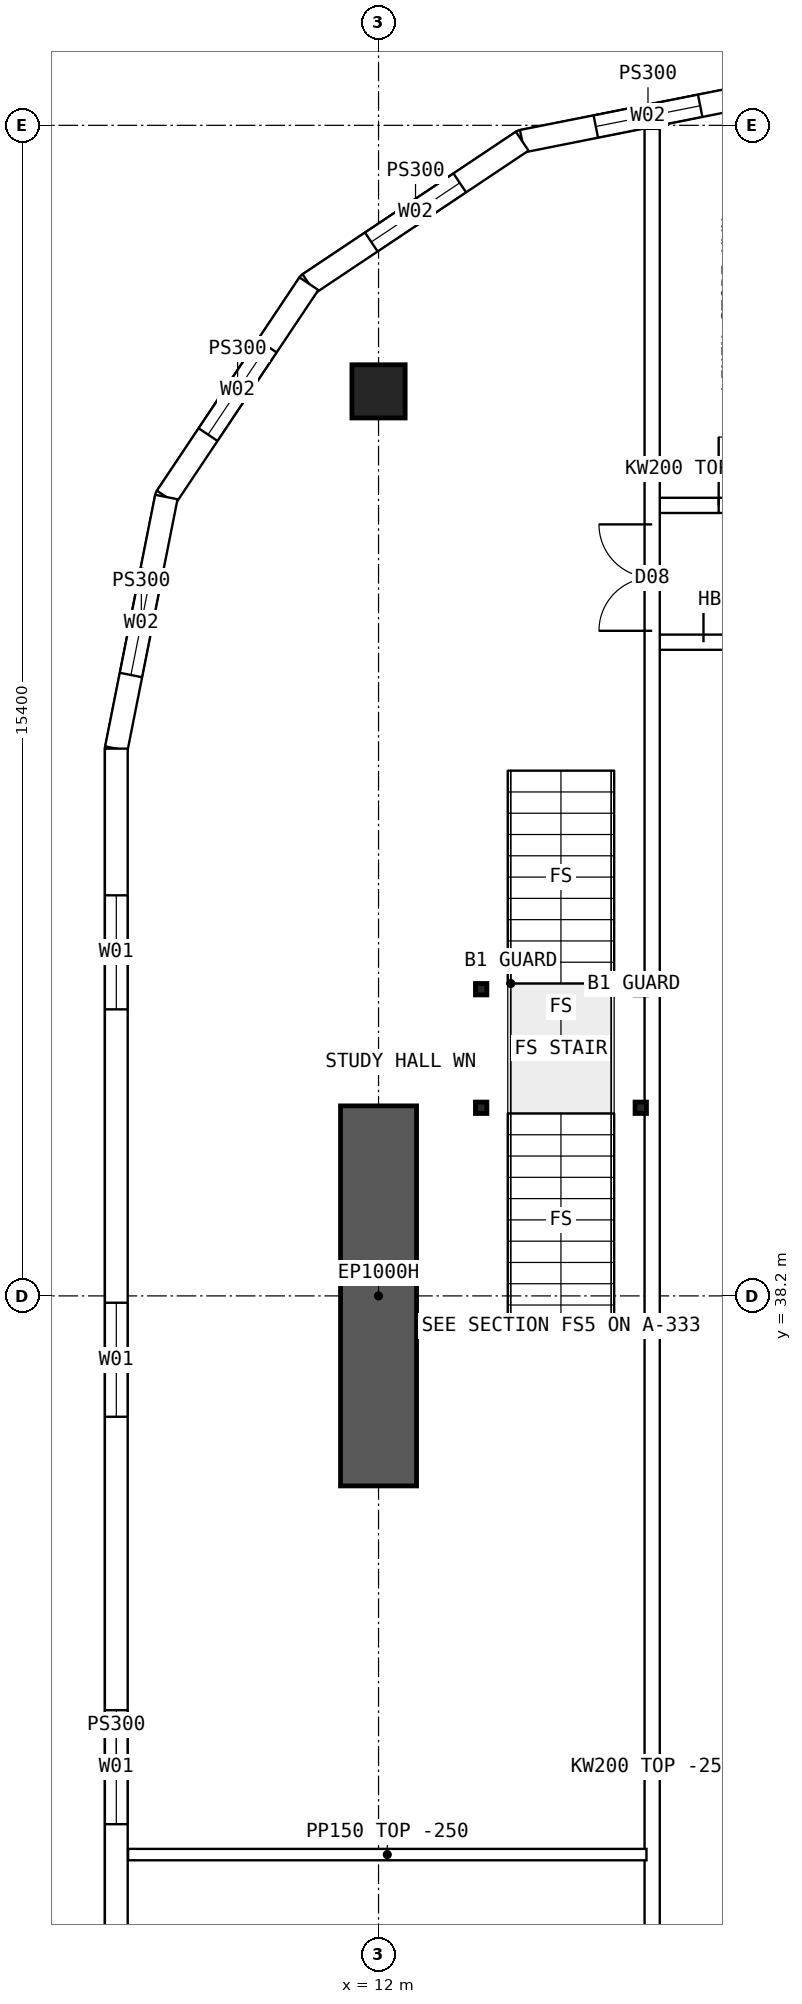
"""IFC4 building model, lengths in metres.
Left out: names, types, materials, properties, quantities, classifications, styles, units other than length and angle.
Written with IfcOpenShell. Run it as: python <this file> out.ifc"""

import sys

from ifc_helpers import new_model, si_unit, direction, frame, frame_2d, origin, origin_2d, place, context, subcontext, project, spatial, polyline, rectangle, hollow_rectangle, outline, extrude, element, fill, save


model = new_model("IFC4")
c1 = context("Model", 3, precision=1e-05, world=origin(), true_north=direction((0.0, 1.0)))
c2 = subcontext(c1, "Body", "Model", "MODEL_VIEW")
j1 = project(units=[si_unit("LENGTHUNIT", "METRE"), si_unit("PLANEANGLEUNIT", "RADIAN")], contexts=[c1])
p1 = place(None, origin())
s1 = spatial("IfcSite", under=j1, at=p1, CompositionType="ELEMENT")
p2 = place(p1, origin())
s2 = spatial("IfcBuilding", under=s1, at=p2, CompositionType="ELEMENT")
p3 = place(p2, frame((0.0, 0.0, 148.6)))
s3 = spatial("IfcBuildingStorey", under=s2, at=p3, CompositionType="ELEMENT", Elevation=148.6)
p4 = place(p3, frame((12.0, 50.1, 0.0), z_axis=(0.0, 0.0, 1.0), x_axis=(1.0, 0.0, 0.0)))
e1 = element("IfcColumn", 1, at=p4, inside=s3, PredefinedType="COLUMN", context=c2, shape_type="SweptSolid", body=[
    extrude(hollow_rectangle(XDim=0.7, YDim=0.7, WallThickness=0.07, at=origin_2d()), origin(), (0.0, 0.0, 1.0), 3.75),
])
p5 = place(p3, frame((12.0, 35.7, 0.0), z_axis=(0.0, 0.0, 1.0), x_axis=(0.0, 1.0, 0.0)))
e2 = element("IfcWall", 2, at=p5, inside=s3, PredefinedType="SHEAR", context=c2, shape_type="SweptSolid", body=[
    extrude(rectangle(XDim=5.0, YDim=1.0, at=frame_2d((2.5, 0.0))), origin(), (0.0, 0.0, 1.0), 3.75),
])
p6 = place(p3, frame((8.55, 45.4, 0.0), z_axis=(0.0, 0.0, 1.0), x_axis=(0.0, -1.0, 0.0)))
e3 = element("IfcWall", 3, at=p6, inside=s3, PredefinedType="SOLIDWALL", context=c2, shape_type="SweptSolid", body=[
    extrude(outline(polyline([(-0.015, -0.15), (26.815, -0.15), (26.785, 0.15), (0.015, 0.15), (-0.015, -0.15)])), origin(), (0.0, 0.0, 1.0), 3.5),
])
p7 = place(p6, frame((1.93, 0.0, 0.9)))
e4 = element("IfcOpeningElement", 4, at=p7, cuts=e3, PredefinedType="OPENING", context=c2, shape_type="SweptSolid", body=[
    extrude(rectangle(XDim=1.5, YDim=2.0, at=frame_2d((0.75, 1.0))), frame((0.0, 0.16, 0.0), z_axis=(0.0, -1.0, 0.0), x_axis=(1.0, 0.0, 0.0)), (0.0, 0.0, 1.0), 0.32),
])
p8 = place(p6, frame((7.29, 0.0, 0.9)))
e5 = element("IfcOpeningElement", 5, at=p8, cuts=e3, PredefinedType="OPENING", context=c2, shape_type="SweptSolid", body=[
    extrude(rectangle(XDim=1.5, YDim=2.0, at=frame_2d((0.75, 1.0))), frame((0.0, 0.16, 0.0), z_axis=(0.0, -1.0, 0.0), x_axis=(1.0, 0.0, 0.0)), (0.0, 0.0, 1.0), 0.32),
])
p9 = place(p6, frame((12.65, 0.0, 0.9)))
e6 = element("IfcOpeningElement", 6, at=p9, cuts=e3, PredefinedType="OPENING", context=c2, shape_type="SweptSolid", body=[
    extrude(rectangle(XDim=1.5, YDim=2.0, at=frame_2d((0.75, 1.0))), frame((0.0, 0.16, 0.0), z_axis=(0.0, -1.0, 0.0), x_axis=(1.0, 0.0, 0.0)), (0.0, 0.0, 1.0), 0.32),
])
p10 = place(p6, frame((18.01, 0.0, 0.9)))
e7 = element("IfcOpeningElement", 7, at=p10, cuts=e3, PredefinedType="OPENING", context=c2, shape_type="SweptSolid", body=[
    extrude(rectangle(XDim=1.5, YDim=2.0, at=frame_2d((0.75, 1.0))), frame((0.0, 0.16, 0.0), z_axis=(0.0, -1.0, 0.0), x_axis=(1.0, 0.0, 0.0)), (0.0, 0.0, 1.0), 0.32),
])
p11 = place(p6, frame((23.37, 0.0, 0.9)))
e8 = element("IfcOpeningElement", 8, at=p11, cuts=e3, PredefinedType="OPENING", context=c2, shape_type="SweptSolid", body=[
    extrude(rectangle(XDim=1.5, YDim=2.0, at=frame_2d((0.75, 1.0))), frame((0.0, 0.16, 0.0), z_axis=(0.0, -1.0, 0.0), x_axis=(1.0, 0.0, 0.0)), (0.0, 0.0, 1.0), 0.32),
])
p12 = place(p3, frame((17.2, 54.05, 0.0), z_axis=(0.0, 0.0, 1.0), x_axis=(-0.98078325777, -0.195100490205, 0.0)))
e9 = element("IfcWall", 9, at=p12, inside=s3, PredefinedType="SOLIDWALL", context=c2, shape_type="SweptSolid", body=[
    extrude(outline(polyline([(-0.03, -0.15), (3.405, -0.15), (3.345, 0.15), (0.03, 0.15), (-0.03, -0.15)])), origin(), (0.0, 0.0, 1.0), 3.5),
])
p13 = place(p12, frame((0.988, 0.0, 0.9)))
e10 = element("IfcOpeningElement", 10, at=p13, cuts=e9, PredefinedType="OPENING", context=c2, shape_type="SweptSolid", body=[
    extrude(rectangle(XDim=1.4, YDim=1.8, at=frame_2d((0.7, 0.9))), frame((0.0, 0.16, 0.0), z_axis=(0.0, -1.0, 0.0), x_axis=(1.0, 0.0, 0.0)), (0.0, 0.0, 1.0), 0.32),
])
p14 = place(p3, frame((13.89, 53.392, 0.0), z_axis=(0.0, 0.0, 1.0), x_axis=(-0.831493450887, -0.555534554399, 0.0)))
e11 = element("IfcWall", 11, at=p14, inside=s3, PredefinedType="SOLIDWALL", context=c2, shape_type="SweptSolid", body=[
    extrude(outline(polyline([(-0.03, -0.15), (3.405, -0.15), (3.345, 0.15), (0.03, 0.15), (-0.03, -0.15)])), origin(), (0.0, 0.0, 1.0), 3.5),
])
p15 = place(p14, frame((0.988, 0.0, 0.9)))
e12 = element("IfcOpeningElement", 12, at=p15, cuts=e11, PredefinedType="OPENING", context=c2, shape_type="SweptSolid", body=[
    extrude(rectangle(XDim=1.4, YDim=1.8, at=frame_2d((0.7, 0.9))), frame((0.0, 0.16, 0.0), z_axis=(0.0, -1.0, 0.0), x_axis=(1.0, 0.0, 0.0)), (0.0, 0.0, 1.0), 0.32),
])
p16 = place(p3, frame((11.083, 51.517, 0.0), z_axis=(0.0, 0.0, 1.0), x_axis=(-0.555534554399, -0.831493450887, 0.0)))
e13 = element("IfcWall", 13, at=p16, inside=s3, PredefinedType="SOLIDWALL", context=c2, shape_type="SweptSolid", body=[
    extrude(outline(polyline([(-0.03, -0.15), (3.405, -0.15), (3.345, 0.15), (0.03, 0.15), (-0.03, -0.15)])), origin(), (0.0, 0.0, 1.0), 3.5),
])
p17 = place(p16, frame((0.988, 0.0, 0.9)))
e14 = element("IfcOpeningElement", 14, at=p17, cuts=e13, PredefinedType="OPENING", context=c2, shape_type="SweptSolid", body=[
    extrude(rectangle(XDim=1.4, YDim=1.8, at=frame_2d((0.7, 0.9))), frame((0.0, 0.16, 0.0), z_axis=(0.0, -1.0, 0.0), x_axis=(1.0, 0.0, 0.0)), (0.0, 0.0, 1.0), 0.32),
])
p18 = place(p3, frame((9.208, 48.71, 0.0), z_axis=(0.0, 0.0, 1.0), x_axis=(-0.19508664885, -0.980786011034, 0.0)))
e15 = element("IfcWall", 15, at=p18, inside=s3, PredefinedType="SOLIDWALL", context=c2, shape_type="SweptSolid", body=[
    extrude(outline(polyline([(-0.03, -0.15), (3.39, -0.15), (3.36, 0.15), (0.03, 0.15), (-0.03, -0.15)])), origin(), (0.0, 0.0, 1.0), 3.5),
])
p19 = place(p18, frame((0.988, 0.0, 0.9)))
e16 = element("IfcOpeningElement", 16, at=p19, cuts=e15, PredefinedType="OPENING", context=c2, shape_type="SweptSolid", body=[
    extrude(rectangle(XDim=1.4, YDim=1.8, at=frame_2d((0.7, 0.9))), frame((0.0, 0.16, 0.0), z_axis=(0.0, -1.0, 0.0), x_axis=(1.0, 0.0, 0.0)), (0.0, 0.0, 1.0), 0.32),
])
p20 = place(p3, frame((15.6, 48.6, 0.0), z_axis=(0.0, 0.0, 1.0), x_axis=(1.0, 0.0, 0.0)))
e17 = element("IfcWall", 17, at=p20, inside=s3, PredefinedType="SOLIDWALL", context=c2, shape_type="SweptSolid", body=[
    extrude(rectangle(XDim=1.975, YDim=0.2, at=frame_2d((0.987, 0.0))), origin(), (0.0, 0.0, 1.0), 3.5),
])
p21 = place(p20, frame((0.875, 0.0, 0.0)))
e18 = element("IfcOpeningElement", 18, at=p21, cuts=e17, PredefinedType="OPENING", context=c2, shape_type="SweptSolid", body=[
    extrude(rectangle(XDim=0.9, YDim=2.1, at=frame_2d((0.45, 1.05))), frame((0.0, 0.11, 0.0), z_axis=(0.0, -1.0, 0.0), x_axis=(1.0, 0.0, 0.0)), (0.0, 0.0, 1.0), 0.22),
])
p22 = place(p3, frame((15.6, 46.8, 0.0), z_axis=(0.0, 0.0, 1.0), x_axis=(1.0, 0.0, 0.0)))
e19 = element("IfcWall", 19, at=p22, inside=s3, PredefinedType="SOLIDWALL", context=c2, shape_type="SweptSolid", body=[
    extrude(rectangle(XDim=1.975, YDim=0.2, at=frame_2d((0.987, 0.0))), origin(), (0.0, 0.0, 1.0), 3.5),
])
p23 = place(p22, frame((0.675, 0.0, 0.0)))
e20 = element("IfcOpeningElement", 20, at=p23, cuts=e19, PredefinedType="OPENING", context=c2, shape_type="SweptSolid", body=[
    extrude(rectangle(XDim=1.2, YDim=2.1, at=frame_2d((0.6, 1.05))), frame((0.0, 0.11, 0.0), z_axis=(0.0, -1.0, 0.0), x_axis=(1.0, 0.0, 0.0)), (0.0, 0.0, 1.0), 0.22),
])
p24 = place(p3, frame((8.705, 30.85, 0.0), z_axis=(0.0, 0.0, 1.0), x_axis=(1.0, 0.0, 0.0)))
e21 = element("IfcWall", 21, at=p24, inside=s3, PredefinedType="PARTITIONING", context=c2, shape_type="SweptSolid", body=[
    extrude(outline(polyline([(0.0, 0.0), (6.82, 0.0), (6.82, 3.5), (3.597, 3.5), (3.595, 3.05), (2.997, 3.05), (2.995, 3.5), (0.0, 3.5), (0.0, 0.0)])), frame((0.0, 0.075, 0.0), z_axis=(0.0, -1.0, 0.0), x_axis=(1.0, 0.0, 0.0)), (0.0, 0.0, 1.0), 0.15),
])
p25 = place(p3, frame((15.6, 10.446, 0.0), z_axis=(0.0, 0.0, 1.0), x_axis=(0.0, 1.0, 0.0)))
e22 = element("IfcWall", 22, at=p25, inside=s3, PredefinedType="SOLIDWALL", context=c2, shape_type="SweptSolid", body=[
    extrude(rectangle(XDim=43.107, YDim=0.2, at=frame_2d((21.554, 0.0))), origin(), (0.0, 0.0, 1.0), 3.5),
])
p26 = place(p25, frame((5.104, 0.0, 0.0)))
e23 = element("IfcOpeningElement", 23, at=p26, cuts=e22, PredefinedType="OPENING", context=c2, shape_type="SweptSolid", body=[
    extrude(rectangle(XDim=1.4, YDim=2.1, at=frame_2d((0.7, 1.05))), frame((0.0, 0.11, 0.0), z_axis=(0.0, -1.0, 0.0), x_axis=(1.0, 0.0, 0.0)), (0.0, 0.0, 1.0), 0.22),
])
p27 = place(p25, frame((36.504, 0.0, 0.0)))
e24 = element("IfcOpeningElement", 24, at=p27, cuts=e22, PredefinedType="OPENING", context=c2, shape_type="SweptSolid", body=[
    extrude(rectangle(XDim=1.4, YDim=2.1, at=frame_2d((0.7, 1.05))), frame((0.0, 0.11, 0.0), z_axis=(0.0, -1.0, 0.0), x_axis=(1.0, 0.0, 0.0)), (0.0, 0.0, 1.0), 0.22),
])
for number, where, z_axis, x_axis in (
    (25, (13.35, 40.675, 0.0), (0.0, 0.0, 1.0), (1.0, 0.0, 0.0)),
    (26, (15.45, 40.675, 0.0), (0.0, 0.0, 1.0), (1.0, 0.0, 0.0)),
    (27, (13.35, 42.235, 0.0), (0.0, 0.0, 1.0), (1.0, 0.0, 0.0)),
    (28, (15.45, 42.235, 0.0), (0.0, 0.0, 1.0), (1.0, 0.0, 0.0)),
):
    element("IfcColumn", number, at=place(p3, frame(where, z_axis=z_axis, x_axis=x_axis)), inside=s3, PredefinedType="COLUMN", context=c2, shape_type="SweptSolid", body=[
        extrude(hollow_rectangle(XDim=0.15, YDim=0.15, WallThickness=0.008, at=origin_2d()), origin(), (0.0, 0.0, 1.0), 3.5),
    ])
p28 = place(p7, origin())
e29 = element("IfcWindow", 29, at=p28, inside=s3, PartitioningType="SINGLE_PANEL", PredefinedType="WINDOW", context=c2, shape_type="SweptSolid", body=[
    extrude(rectangle(XDim=1.5, YDim=2.0, at=frame_2d((0.75, 1.0))), frame((0.0, 0.03, 0.0), z_axis=(0.0, -1.0, 0.0), x_axis=(1.0, 0.0, 0.0)), (0.0, 0.0, 1.0), 0.06),
])
fill(e4, e29)
p29 = place(p8, origin())
e30 = element("IfcWindow", 30, at=p29, inside=s3, PartitioningType="SINGLE_PANEL", PredefinedType="WINDOW", context=c2, shape_type="SweptSolid", body=[
    extrude(rectangle(XDim=1.5, YDim=2.0, at=frame_2d((0.75, 1.0))), frame((0.0, 0.03, 0.0), z_axis=(0.0, -1.0, 0.0), x_axis=(1.0, 0.0, 0.0)), (0.0, 0.0, 1.0), 0.06),
])
fill(e5, e30)
p30 = place(p9, origin())
e31 = element("IfcWindow", 31, at=p30, inside=s3, PartitioningType="SINGLE_PANEL", PredefinedType="WINDOW", context=c2, shape_type="SweptSolid", body=[
    extrude(rectangle(XDim=1.5, YDim=2.0, at=frame_2d((0.75, 1.0))), frame((0.0, 0.03, 0.0), z_axis=(0.0, -1.0, 0.0), x_axis=(1.0, 0.0, 0.0)), (0.0, 0.0, 1.0), 0.06),
])
fill(e6, e31)
p31 = place(p13, origin())
e32 = element("IfcWindow", 32, at=p31, inside=s3, PartitioningType="SINGLE_PANEL", PredefinedType="WINDOW", context=c2, shape_type="SweptSolid", body=[
    extrude(rectangle(XDim=1.4, YDim=1.8, at=frame_2d((0.7, 0.9))), frame((0.0, 0.03, 0.0), z_axis=(0.0, -1.0, 0.0), x_axis=(1.0, 0.0, 0.0)), (0.0, 0.0, 1.0), 0.06),
])
fill(e10, e32)
p32 = place(p15, origin())
e33 = element("IfcWindow", 33, at=p32, inside=s3, PartitioningType="SINGLE_PANEL", PredefinedType="WINDOW", context=c2, shape_type="SweptSolid", body=[
    extrude(rectangle(XDim=1.4, YDim=1.8, at=frame_2d((0.7, 0.9))), frame((0.0, 0.03, 0.0), z_axis=(0.0, -1.0, 0.0), x_axis=(1.0, 0.0, 0.0)), (0.0, 0.0, 1.0), 0.06),
])
fill(e12, e33)
p33 = place(p17, origin())
e34 = element("IfcWindow", 34, at=p33, inside=s3, PartitioningType="SINGLE_PANEL", PredefinedType="WINDOW", context=c2, shape_type="SweptSolid", body=[
    extrude(rectangle(XDim=1.4, YDim=1.8, at=frame_2d((0.7, 0.9))), frame((0.0, 0.03, 0.0), z_axis=(0.0, -1.0, 0.0), x_axis=(1.0, 0.0, 0.0)), (0.0, 0.0, 1.0), 0.06),
])
fill(e14, e34)
p34 = place(p19, origin())
e35 = element("IfcWindow", 35, at=p34, inside=s3, PartitioningType="SINGLE_PANEL", PredefinedType="WINDOW", context=c2, shape_type="SweptSolid", body=[
    extrude(rectangle(XDim=1.4, YDim=1.8, at=frame_2d((0.7, 0.9))), frame((0.0, 0.03, 0.0), z_axis=(0.0, -1.0, 0.0), x_axis=(1.0, 0.0, 0.0)), (0.0, 0.0, 1.0), 0.06),
])
fill(e16, e35)
p35 = place(p23, origin())
e36 = element("IfcDoor", 36, at=p35, inside=s3, OperationType="DOUBLE_DOOR_SINGLE_SWING", PredefinedType="DOOR", context=c2, shape_type="SweptSolid", body=[
    extrude(rectangle(XDim=1.2, YDim=2.1, at=frame_2d((0.6, 1.05))), frame((0.0, 0.025, 0.0), z_axis=(0.0, -1.0, 0.0), x_axis=(1.0, 0.0, 0.0)), (0.0, 0.0, 1.0), 0.05),
])
fill(e20, e36)
p36 = place(p27, origin())
e37 = element("IfcDoor", 37, at=p36, inside=s3, OperationType="DOUBLE_DOOR_SINGLE_SWING", PredefinedType="DOOR", context=c2, shape_type="SweptSolid", body=[
    extrude(rectangle(XDim=1.4, YDim=2.1, at=frame_2d((0.7, 1.05))), frame((0.0, 0.025, 0.0), z_axis=(0.0, -1.0, 0.0), x_axis=(1.0, 0.0, 0.0)), (0.0, 0.0, 1.0), 0.05),
])
fill(e24, e37)
p37 = place(p21, origin())
e38 = element("IfcDoor", 38, at=p37, inside=s3, OperationType="SINGLE_SWING_LEFT", PredefinedType="DOOR", context=c2, shape_type="SweptSolid", body=[
    extrude(rectangle(XDim=0.9, YDim=2.1, at=frame_2d((0.45, 1.05))), frame((0.0, 0.025, 0.0), z_axis=(0.0, -1.0, 0.0), x_axis=(1.0, 0.0, 0.0)), (0.0, 0.0, 1.0), 0.05),
])
fill(e18, e38)
save(model, sys.argv[1])
